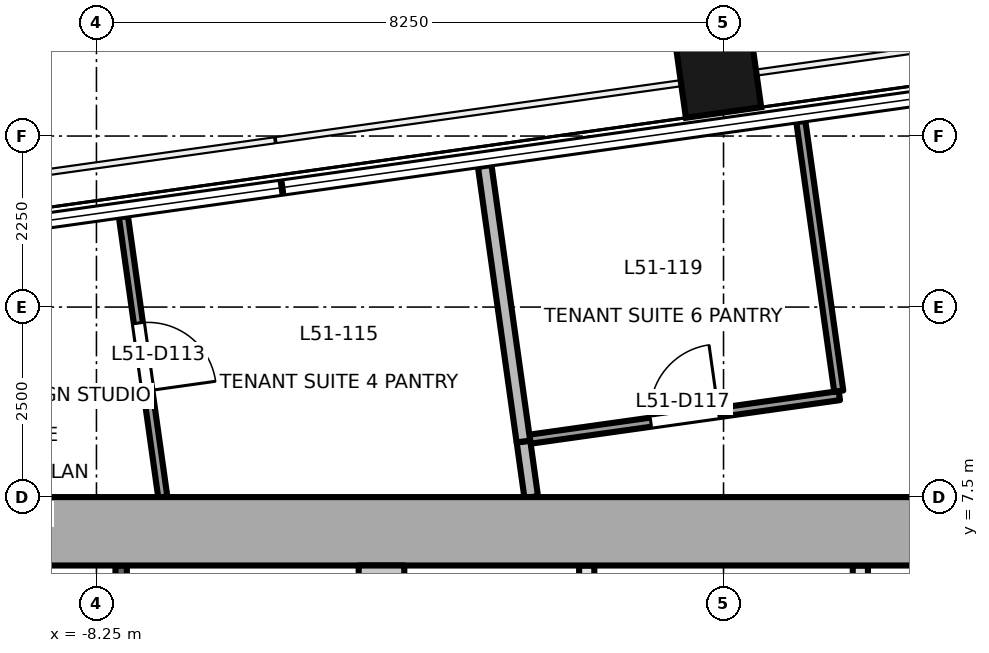
"""IFC4 building model, lengths in metres.
Left out: names, types, materials, properties, quantities, classifications, styles, units other than length and angle.
Written with IfcOpenShell. Run it as: python <this file> out.ifc"""

import sys

from ifc_helpers import new_model, si_unit, direction, frame, frame_2d, origin, origin_2d, place, context, subcontext, project, spatial, rectangle, extrude, element, fill, save


model = new_model("IFC4")
c1 = context("Model", 3, precision=1e-05, world=origin(), true_north=direction((0.0, 1.0)))
c2 = subcontext(c1, "Body", "Model", "MODEL_VIEW")
j1 = project(units=[si_unit("LENGTHUNIT", "METRE"), si_unit("PLANEANGLEUNIT", "RADIAN")], contexts=[c1])
p1 = place(None, origin())
s1 = spatial("IfcSite", under=j1, at=p1, CompositionType="ELEMENT")
p2 = place(p1, origin())
s2 = spatial("IfcBuilding", under=s1, at=p2, CompositionType="ELEMENT")
p3 = place(p2, frame((0.0, 0.0, 225.2)))
s3 = spatial("IfcBuildingStorey", under=s2, at=p3, CompositionType="ELEMENT", Elevation=225.2)
p4 = place(p3, frame((-0.125, 13.451, -0.2), z_axis=(0.0, 0.0, 1.0), x_axis=(0.990268068742, 0.13917310096, 0.0)))
e1 = element("IfcColumn", 1, at=p4, inside=s3, PredefinedType="COLUMN", context=c2, shape_type="SweptSolid", body=[
    extrude(rectangle(XDim=1.0, YDim=1.8, at=origin_2d()), origin(), (0.0, 0.0, 1.0), 3.9),
])
p5 = place(p3, frame((-18.0, 7.05, -0.2), z_axis=(0.0, 0.0, 1.0), x_axis=(1.0, 0.0, 0.0)))
e2 = element("IfcWall", 2, at=p5, inside=s3, PredefinedType="SHEAR", context=c2, shape_type="SweptSolid", body=[
    extrude(rectangle(XDim=36.0, YDim=0.9, at=frame_2d((18.0, 0.0))), origin(), (0.0, 0.0, 1.0), 3.9),
])
p6 = place(p3, frame((-4.5, -6.6, -0.2), z_axis=(0.0, 0.0, 1.0), x_axis=(0.0, 1.0, 0.0)))
e3 = element("IfcWall", 3, at=p6, inside=s3, PredefinedType="SHEAR", context=c2, shape_type="SweptSolid", body=[
    extrude(rectangle(XDim=13.2, YDim=0.6, at=frame_2d((6.6, 0.0))), origin(), (0.0, 0.0, 1.0), 3.9),
])
p7 = place(p3, frame((-7.925, -6.6, 0.0), z_axis=(0.0, 0.0, 1.0), x_axis=(0.0, 1.0, 0.0)))
e4 = element("IfcWall", 4, at=p7, inside=s3, PredefinedType="PARTITIONING", context=c2, shape_type="SweptSolid", body=[
    extrude(rectangle(XDim=13.2, YDim=0.15, at=frame_2d((6.6, 0.0))), origin(), (0.0, 0.0, 1.0), 3.7),
])
p8 = place(p7, frame((0.87, 0.0, 0.0)))
e5 = element("IfcOpeningElement", 5, at=p8, cuts=e4, PredefinedType="OPENING", context=c2, shape_type="SweptSolid", body=[
    extrude(rectangle(XDim=0.9, YDim=2.1, at=frame_2d((0.45, 1.05))), frame((0.0, 0.085, 0.0), z_axis=(0.0, -1.0, 0.0), x_axis=(1.0, 0.0, 0.0)), (0.0, 0.0, 1.0), 0.171),
])
p9 = place(p7, frame((3.51, 0.0, 0.0)))
e6 = element("IfcOpeningElement", 6, at=p9, cuts=e4, PredefinedType="OPENING", context=c2, shape_type="SweptSolid", body=[
    extrude(rectangle(XDim=0.9, YDim=2.1, at=frame_2d((0.45, 1.05))), frame((0.0, 0.085, 0.0), z_axis=(0.0, -1.0, 0.0), x_axis=(1.0, 0.0, 0.0)), (0.0, 0.0, 1.0), 0.171),
])
p10 = place(p7, frame((6.15, 0.0, 0.0)))
e7 = element("IfcOpeningElement", 7, at=p10, cuts=e4, PredefinedType="OPENING", context=c2, shape_type="SweptSolid", body=[
    extrude(rectangle(XDim=0.9, YDim=2.1, at=frame_2d((0.45, 1.05))), frame((0.0, 0.085, 0.0), z_axis=(0.0, -1.0, 0.0), x_axis=(1.0, 0.0, 0.0)), (0.0, 0.0, 1.0), 0.171),
])
p11 = place(p7, frame((8.79, 0.0, 0.0)))
e8 = element("IfcOpeningElement", 8, at=p11, cuts=e4, PredefinedType="OPENING", context=c2, shape_type="SweptSolid", body=[
    extrude(rectangle(XDim=0.9, YDim=2.1, at=frame_2d((0.45, 1.05))), frame((0.0, 0.085, 0.0), z_axis=(0.0, -1.0, 0.0), x_axis=(1.0, 0.0, 0.0)), (0.0, 0.0, 1.0), 0.171),
])
p12 = place(p7, frame((11.43, 0.0, 0.0)))
e9 = element("IfcOpeningElement", 9, at=p12, cuts=e4, PredefinedType="OPENING", context=c2, shape_type="SweptSolid", body=[
    extrude(rectangle(XDim=0.9, YDim=2.1, at=frame_2d((0.45, 1.05))), frame((0.0, 0.085, 0.0), z_axis=(0.0, -1.0, 0.0), x_axis=(1.0, 0.0, 0.0)), (0.0, 0.0, 1.0), 0.171),
])
p13 = place(p3, frame((-1.8, -6.6, 0.0), z_axis=(0.0, 0.0, 1.0), x_axis=(0.0, 1.0, 0.0)))
e10 = element("IfcWall", 10, at=p13, inside=s3, PredefinedType="PARTITIONING", context=c2, shape_type="SweptSolid", body=[
    extrude(rectangle(XDim=13.2, YDim=0.2, at=frame_2d((6.6, 0.0))), origin(), (0.0, 0.0, 1.0), 3.7),
])
p14 = place(p13, frame((0.55, 0.0, 0.0)))
e11 = element("IfcOpeningElement", 11, at=p14, cuts=e10, PredefinedType="OPENING", context=c2, shape_type="SweptSolid", body=[
    extrude(rectangle(XDim=0.9, YDim=2.1, at=frame_2d((0.45, 1.05))), frame((0.0, 0.111, 0.0), z_axis=(0.0, -1.0, 0.0), x_axis=(1.0, 0.0, 0.0)), (0.0, 0.0, 1.0), 0.221),
])
p15 = place(p13, frame((2.9, 0.0, 0.0)))
e12 = element("IfcOpeningElement", 12, at=p15, cuts=e10, PredefinedType="OPENING", context=c2, shape_type="SweptSolid", body=[
    extrude(rectangle(XDim=1.2, YDim=2.1, at=frame_2d((0.6, 1.05))), frame((0.0, 0.111, 0.0), z_axis=(0.0, -1.0, 0.0), x_axis=(1.0, 0.0, 0.0)), (0.0, 0.0, 1.0), 0.221),
])
p16 = place(p13, frame((5.7, 0.0, 0.0)))
e13 = element("IfcOpeningElement", 13, at=p16, cuts=e10, PredefinedType="OPENING", context=c2, shape_type="SweptSolid", body=[
    extrude(rectangle(XDim=1.2, YDim=2.1, at=frame_2d((0.6, 1.05))), frame((0.0, 0.111, 0.0), z_axis=(0.0, -1.0, 0.0), x_axis=(1.0, 0.0, 0.0)), (0.0, 0.0, 1.0), 0.221),
])
p17 = place(p13, frame((8.5, 0.0, 0.0)))
e14 = element("IfcOpeningElement", 14, at=p17, cuts=e10, PredefinedType="OPENING", context=c2, shape_type="SweptSolid", body=[
    extrude(rectangle(XDim=1.2, YDim=2.1, at=frame_2d((0.6, 1.05))), frame((0.0, 0.111, 0.0), z_axis=(0.0, -1.0, 0.0), x_axis=(1.0, 0.0, 0.0)), (0.0, 0.0, 1.0), 0.221),
])
p18 = place(p13, frame((11.3, 0.0, 0.0)))
e15 = element("IfcOpeningElement", 15, at=p18, cuts=e10, PredefinedType="OPENING", context=c2, shape_type="SweptSolid", body=[
    extrude(rectangle(XDim=1.2, YDim=2.1, at=frame_2d((0.6, 1.05))), frame((0.0, 0.111, 0.0), z_axis=(0.0, -1.0, 0.0), x_axis=(1.0, 0.0, 0.0)), (0.0, 0.0, 1.0), 0.221),
])
p19 = place(p3, frame((1.8, -6.6, 0.0), z_axis=(0.0, 0.0, 1.0), x_axis=(0.0, 1.0, 0.0)))
e16 = element("IfcWall", 16, at=p19, inside=s3, PredefinedType="PARTITIONING", context=c2, shape_type="SweptSolid", body=[
    extrude(rectangle(XDim=13.2, YDim=0.2, at=frame_2d((6.6, 0.0))), origin(), (0.0, 0.0, 1.0), 3.7),
])
p20 = place(p19, frame((0.55, 0.0, 0.0)))
e17 = element("IfcOpeningElement", 17, at=p20, cuts=e16, PredefinedType="OPENING", context=c2, shape_type="SweptSolid", body=[
    extrude(rectangle(XDim=0.9, YDim=2.1, at=frame_2d((0.45, 1.05))), frame((0.0, 0.111, 0.0), z_axis=(0.0, -1.0, 0.0), x_axis=(1.0, 0.0, 0.0)), (0.0, 0.0, 1.0), 0.221),
])
p21 = place(p19, frame((2.9, 0.0, 0.0)))
e18 = element("IfcOpeningElement", 18, at=p21, cuts=e16, PredefinedType="OPENING", context=c2, shape_type="SweptSolid", body=[
    extrude(rectangle(XDim=1.2, YDim=2.1, at=frame_2d((0.6, 1.05))), frame((0.0, 0.111, 0.0), z_axis=(0.0, -1.0, 0.0), x_axis=(1.0, 0.0, 0.0)), (0.0, 0.0, 1.0), 0.221),
])
p22 = place(p19, frame((5.7, 0.0, 0.0)))
e19 = element("IfcOpeningElement", 19, at=p22, cuts=e16, PredefinedType="OPENING", context=c2, shape_type="SweptSolid", body=[
    extrude(rectangle(XDim=1.2, YDim=2.1, at=frame_2d((0.6, 1.05))), frame((0.0, 0.111, 0.0), z_axis=(0.0, -1.0, 0.0), x_axis=(1.0, 0.0, 0.0)), (0.0, 0.0, 1.0), 0.221),
])
p23 = place(p19, frame((8.5, 0.0, 0.0)))
e20 = element("IfcOpeningElement", 20, at=p23, cuts=e16, PredefinedType="OPENING", context=c2, shape_type="SweptSolid", body=[
    extrude(rectangle(XDim=1.2, YDim=2.1, at=frame_2d((0.6, 1.05))), frame((0.0, 0.111, 0.0), z_axis=(0.0, -1.0, 0.0), x_axis=(1.0, 0.0, 0.0)), (0.0, 0.0, 1.0), 0.221),
])
p24 = place(p19, frame((11.3, 0.0, 0.0)))
e21 = element("IfcOpeningElement", 21, at=p24, cuts=e16, PredefinedType="OPENING", context=c2, shape_type="SweptSolid", body=[
    extrude(rectangle(XDim=1.2, YDim=2.1, at=frame_2d((0.6, 1.05))), frame((0.0, 0.111, 0.0), z_axis=(0.0, -1.0, 0.0), x_axis=(1.0, 0.0, 0.0)), (0.0, 0.0, 1.0), 0.221),
])
p25 = place(p3, frame((-7.895, 11.188, 0.0), z_axis=(0.0, 0.0, 1.0), x_axis=(0.139108182039, -0.990277190331, 0.0)))
e22 = element("IfcWall", 22, at=p25, inside=s3, PredefinedType="PARTITIONING", context=c2, shape_type="SweptSolid", body=[
    extrude(rectangle(XDim=3.724, YDim=0.12, at=frame_2d((1.862, 0.0))), origin(), (0.0, 0.0, 1.0), 3.7),
])
p26 = place(p25, frame((1.412, 0.0, 0.0)))
e23 = element("IfcOpeningElement", 23, at=p26, cuts=e22, PredefinedType="OPENING", context=c2, shape_type="SweptSolid", body=[
    extrude(rectangle(XDim=0.9, YDim=2.1, at=frame_2d((0.45, 1.05))), frame((0.0, 0.071, 0.0), z_axis=(0.0, -1.0, 0.0), x_axis=(1.0, 0.0, 0.0)), (0.0, 0.0, 1.0), 0.141),
])
p27 = place(p3, frame((-2.632, 8.23, 0.0), z_axis=(0.0, 0.0, 1.0), x_axis=(0.138452925943, -0.99036901572, 0.0)))
e24 = element("IfcWall", 24, at=p27, inside=s3, PredefinedType="PARTITIONING", context=c2, shape_type="SweptSolid", body=[
    extrude(rectangle(XDim=0.737, YDim=0.18, at=frame_2d((0.369, 0.0))), origin(), (0.0, 0.0, 1.0), 3.7),
])
p28 = place(p3, frame((-3.142, 11.856, 0.0), z_axis=(0.0, 0.0, 1.0), x_axis=(0.139058624332, -0.990284150635, 0.0)))
e25 = element("IfcWall", 25, at=p28, inside=s3, PredefinedType="PARTITIONING", context=c2, shape_type="SweptSolid", body=[
    extrude(rectangle(XDim=3.661, YDim=0.18, at=frame_2d((1.83, 0.0))), origin(), (0.0, 0.0, 1.0), 3.7),
])
p29 = place(p3, frame((-2.546, 8.262, 0.0), z_axis=(0.0, 0.0, 1.0), x_axis=(0.990233783149, 0.139416837975, 0.0)))
e26 = element("IfcWall", 26, at=p29, inside=s3, PredefinedType="PARTITIONING", context=c2, shape_type="SweptSolid", body=[
    extrude(rectangle(XDim=4.11, YDim=0.12, at=frame_2d((2.055, 0.0))), origin(), (0.0, 0.0, 1.0), 3.4),
])
p30 = place(p29, frame((1.605, 0.0, 0.0)))
e27 = element("IfcOpeningElement", 27, at=p30, cuts=e26, PredefinedType="OPENING", context=c2, shape_type="SweptSolid", body=[
    extrude(rectangle(XDim=0.9, YDim=2.1, at=frame_2d((0.45, 1.05))), frame((0.0, 0.071, 0.0), z_axis=(0.0, -1.0, 0.0), x_axis=(1.0, 0.0, 0.0)), (0.0, 0.0, 1.0), 0.141),
])
p31 = place(p3, frame((1.516, 8.894, 0.0), z_axis=(0.0, 0.0, 1.0), x_axis=(-0.139321670591, 0.990247177276, 0.0)))
e28 = element("IfcWall", 28, at=p31, inside=s3, PredefinedType="PARTITIONING", context=c2, shape_type="SweptSolid", body=[
    extrude(rectangle(XDim=3.582, YDim=0.12, at=frame_2d((1.791, 0.0))), origin(), (0.0, 0.0, 1.0), 3.7),
])
p32 = place(p26, origin())
e29 = element("IfcDoor", 29, at=p32, inside=s3, OperationType="SINGLE_SWING_RIGHT", PredefinedType="DOOR", context=c2, shape_type="SweptSolid", body=[
    extrude(rectangle(XDim=0.9, YDim=2.1, at=frame_2d((0.45, 1.05))), frame((0.0, 0.025, 0.0), z_axis=(0.0, -1.0, 0.0), x_axis=(1.0, 0.0, 0.0)), (0.0, 0.0, 1.0), 0.05),
])
fill(e23, e29)
p33 = place(p30, origin())
e30 = element("IfcDoor", 30, at=p33, inside=s3, OperationType="SINGLE_SWING_RIGHT", PredefinedType="DOOR", context=c2, shape_type="SweptSolid", body=[
    extrude(rectangle(XDim=0.9, YDim=2.1, at=frame_2d((0.45, 1.05))), frame((0.0, 0.025, 0.0), z_axis=(0.0, -1.0, 0.0), x_axis=(1.0, 0.0, 0.0)), (0.0, 0.0, 1.0), 0.05),
])
fill(e27, e30)
save(model, sys.argv[1])
